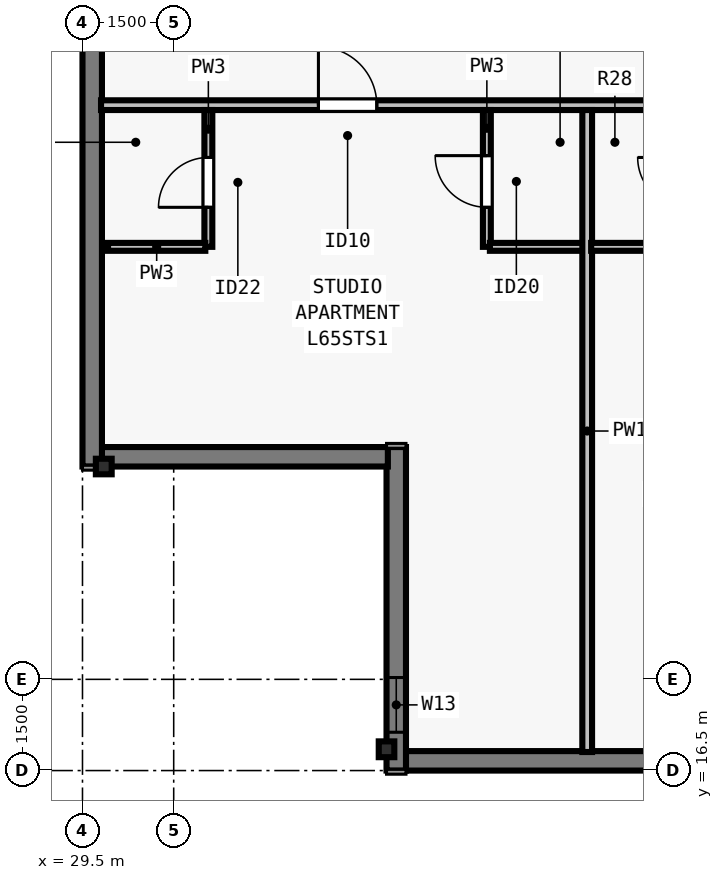
"""IFC4 building model, lengths in metres.
Left out: names, types, materials, properties, quantities, classifications, styles, units other than length and angle.
Written with IfcOpenShell. Run it as: python <this file> out.ifc"""

import sys

from ifc_helpers import new_model, si_unit, direction, frame, frame_2d, origin, origin_2d, place, context, subcontext, project, spatial, rectangle, i_section, extrude, element, fill, save


model = new_model("IFC4")
c1 = context("Model", 3, precision=1e-05, world=origin(), true_north=direction((0.0, 1.0)))
c2 = subcontext(c1, "Body", "Model", "MODEL_VIEW")
j1 = project(units=[si_unit("LENGTHUNIT", "METRE"), si_unit("PLANEANGLEUNIT", "RADIAN")], contexts=[c1])
p1 = place(None, origin())
s1 = spatial("IfcSite", under=j1, at=p1, CompositionType="ELEMENT")
p2 = place(p1, origin())
s2 = spatial("IfcBuilding", under=s1, at=p2, CompositionType="ELEMENT")
p3 = place(p2, frame((0.0, 0.0, 237.5)))
s3 = spatial("IfcBuildingStorey", under=s2, at=p3, CompositionType="ELEMENT", Elevation=237.5)
for number, where, z_axis, x_axis in (
    (1, (34.5, 16.85, 0.0), (0.0, 0.0, 1.0), (1.0, 0.0, 0.0)),
    (2, (29.85, 21.5, 0.0), (0.0, 0.0, 1.0), (0.0, 1.0, 0.0)),
):
    element("IfcColumn", number, at=place(p3, frame(where, z_axis=z_axis, x_axis=x_axis)), inside=s3, PredefinedType="COLUMN", context=c2, shape_type="SweptSolid", body=[
        extrude(i_section(OverallWidth=0.256, OverallDepth=0.26, WebThickness=0.01, FlangeThickness=0.017, FilletRadius=0.013, at=origin_2d()), origin(), (0.0, 0.0, 1.0), 3.5),
    ])
p4 = place(p3, frame((69.5, 16.66, 0.0), z_axis=(0.0, 0.0, 1.0), x_axis=(-1.0, 0.0, 0.0)))
e3 = element("IfcWall", 3, at=p4, inside=s3, PredefinedType="SOLIDWALL", context=c2, shape_type="SweptSolid", body=[
    extrude(rectangle(XDim=34.702, YDim=0.32, at=frame_2d((17.351, 0.0))), origin(), (0.0, 0.0, 1.0), 3.29),
])
p5 = place(p4, frame((4.613, 0.0, 0.8)))
e4 = element("IfcOpeningElement", 4, at=p5, cuts=e3, PredefinedType="OPENING", context=c2, shape_type="SweptSolid", body=[
    extrude(rectangle(XDim=1.85, YDim=1.678, at=frame_2d((0.925, 0.839))), frame((0.0, 0.17, 0.0), z_axis=(0.0, -1.0, 0.0), x_axis=(1.0, 0.0, 0.0)), (0.0, 0.0, 1.0), 0.34),
])
p6 = place(p4, frame((8.138, 0.0, 0.8)))
e5 = element("IfcOpeningElement", 5, at=p6, cuts=e3, PredefinedType="OPENING", context=c2, shape_type="SweptSolid", body=[
    extrude(rectangle(XDim=1.55, YDim=1.678, at=frame_2d((0.775, 0.839))), frame((0.0, 0.17, 0.0), z_axis=(0.0, -1.0, 0.0), x_axis=(1.0, 0.0, 0.0)), (0.0, 0.0, 1.0), 0.34),
])
p7 = place(p4, frame((14.888, 0.0, 0.8)))
e6 = element("IfcOpeningElement", 6, at=p7, cuts=e3, PredefinedType="OPENING", context=c2, shape_type="SweptSolid", body=[
    extrude(rectangle(XDim=1.55, YDim=1.678, at=frame_2d((0.775, 0.839))), frame((0.0, 0.17, 0.0), z_axis=(0.0, -1.0, 0.0), x_axis=(1.0, 0.0, 0.0)), (0.0, 0.0, 1.0), 0.34),
])
p8 = place(p4, frame((18.114, 0.0, 0.8)))
e7 = element("IfcOpeningElement", 7, at=p8, cuts=e3, PredefinedType="OPENING", context=c2, shape_type="SweptSolid", body=[
    extrude(rectangle(XDim=1.85, YDim=1.678, at=frame_2d((0.925, 0.839))), frame((0.0, 0.17, 0.0), z_axis=(0.0, -1.0, 0.0), x_axis=(1.0, 0.0, 0.0)), (0.0, 0.0, 1.0), 0.34),
])
p9 = place(p4, frame((25.714, 0.0, 0.8)))
e8 = element("IfcOpeningElement", 8, at=p9, cuts=e3, PredefinedType="OPENING", context=c2, shape_type="SweptSolid", body=[
    extrude(rectangle(XDim=1.85, YDim=1.678, at=frame_2d((0.925, 0.839))), frame((0.0, 0.17, 0.0), z_axis=(0.0, -1.0, 0.0), x_axis=(1.0, 0.0, 0.0)), (0.0, 0.0, 1.0), 0.34),
])
p10 = place(p4, frame((28.389, 0.0, 0.8)))
e9 = element("IfcOpeningElement", 9, at=p10, cuts=e3, PredefinedType="OPENING", context=c2, shape_type="SweptSolid", body=[
    extrude(rectangle(XDim=1.55, YDim=1.678, at=frame_2d((0.775, 0.839))), frame((0.0, 0.17, 0.0), z_axis=(0.0, -1.0, 0.0), x_axis=(1.0, 0.0, 0.0)), (0.0, 0.0, 1.0), 0.34),
])
p11 = place(p3, frame((34.66, 16.5, 0.0), z_axis=(0.0, 0.0, 1.0), x_axis=(0.0, 1.0, 0.0)))
e10 = element("IfcWall", 10, at=p11, inside=s3, PredefinedType="SOLIDWALL", context=c2, shape_type="SweptSolid", body=[
    extrude(rectangle(XDim=5.32, YDim=0.32, at=frame_2d((2.66, 0.0))), origin(), (0.0, 0.0, 1.0), 3.29),
])
p12 = place(p11, frame((0.63, 0.0, 0.8)))
e11 = element("IfcOpeningElement", 11, at=p12, cuts=e10, PredefinedType="OPENING", context=c2, shape_type="SweptSolid", body=[
    extrude(rectangle(XDim=0.9, YDim=1.678, at=frame_2d((0.45, 0.839))), frame((0.0, 0.17, 0.0), z_axis=(0.0, -1.0, 0.0), x_axis=(1.0, 0.0, 0.0)), (0.0, 0.0, 1.0), 0.34),
])
p13 = place(p3, frame((34.522, 21.66, 0.0), z_axis=(0.0, 0.0, 1.0), x_axis=(-1.0, 0.0, 0.0)))
e12 = element("IfcWall", 12, at=p13, inside=s3, PredefinedType="SOLIDWALL", context=c2, shape_type="SweptSolid", body=[
    extrude(rectangle(XDim=4.724, YDim=0.32, at=frame_2d((2.362, 0.0))), origin(), (0.0, 0.0, 1.0), 3.29),
])
p14 = place(p3, frame((29.66, 21.5, 0.0), z_axis=(0.0, 0.0, 1.0), x_axis=(0.0, 1.0, 0.0)))
e13 = element("IfcWall", 13, at=p14, inside=s3, PredefinedType="SOLIDWALL", context=c2, shape_type="SweptSolid", body=[
    extrude(rectangle(XDim=13.002, YDim=0.32, at=frame_2d((6.501, 0.0))), origin(), (0.0, 0.0, 1.0), 3.29),
])
p15 = place(p14, frame((9.451, 0.0, 0.8)))
e14 = element("IfcOpeningElement", 14, at=p15, cuts=e13, PredefinedType="OPENING", context=c2, shape_type="SweptSolid", body=[
    extrude(rectangle(XDim=1.55, YDim=1.678, at=frame_2d((0.775, 0.839))), frame((0.0, 0.17, 0.0), z_axis=(0.0, -1.0, 0.0), x_axis=(1.0, 0.0, 0.0)), (0.0, 0.0, 1.0), 0.34),
])
p16 = place(p3, frame((29.805, 27.442, 0.0), z_axis=(0.0, 0.0, 1.0), x_axis=(1.0, 0.0, 0.0)))
e15 = element("IfcWall", 15, at=p16, inside=s3, PredefinedType="PARTITIONING", context=c2, shape_type="SweptSolid", body=[
    extrude(rectangle(XDim=44.39, YDim=0.16, at=frame_2d((22.195, 0.0))), origin(), (0.0, 0.0, 1.0), 2.958),
])
p17 = place(p16, frame((3.575, 0.0, 0.0)))
e16 = element("IfcOpeningElement", 16, at=p17, cuts=e15, PredefinedType="OPENING", context=c2, shape_type="SweptSolid", body=[
    extrude(rectangle(XDim=0.96, YDim=2.18, at=frame_2d((0.48, 1.09))), frame((0.0, 0.09, 0.0), z_axis=(0.0, -1.0, 0.0), x_axis=(1.0, 0.0, 0.0)), (0.0, 0.0, 1.0), 0.18),
])
p18 = place(p16, frame((10.755, 0.0, 0.0)))
e17 = element("IfcOpeningElement", 17, at=p18, cuts=e15, PredefinedType="OPENING", context=c2, shape_type="SweptSolid", body=[
    extrude(rectangle(XDim=0.96, YDim=2.18, at=frame_2d((0.48, 1.09))), frame((0.0, 0.09, 0.0), z_axis=(0.0, -1.0, 0.0), x_axis=(1.0, 0.0, 0.0)), (0.0, 0.0, 1.0), 0.18),
])
p19 = place(p16, frame((18.115, 0.0, 0.0)))
e18 = element("IfcOpeningElement", 18, at=p19, cuts=e15, PredefinedType="OPENING", context=c2, shape_type="SweptSolid", body=[
    extrude(rectangle(XDim=0.96, YDim=2.18, at=frame_2d((0.48, 1.09))), frame((0.0, 0.09, 0.0), z_axis=(0.0, -1.0, 0.0), x_axis=(1.0, 0.0, 0.0)), (0.0, 0.0, 1.0), 0.18),
])
p20 = place(p16, frame((25.475, 0.0, 0.0)))
e19 = element("IfcOpeningElement", 19, at=p20, cuts=e15, PredefinedType="OPENING", context=c2, shape_type="SweptSolid", body=[
    extrude(rectangle(XDim=0.96, YDim=2.18, at=frame_2d((0.48, 1.09))), frame((0.0, 0.09, 0.0), z_axis=(0.0, -1.0, 0.0), x_axis=(1.0, 0.0, 0.0)), (0.0, 0.0, 1.0), 0.18),
])
p21 = place(p16, frame((32.835, 0.0, 0.0)))
e20 = element("IfcOpeningElement", 20, at=p21, cuts=e15, PredefinedType="OPENING", context=c2, shape_type="SweptSolid", body=[
    extrude(rectangle(XDim=0.96, YDim=2.18, at=frame_2d((0.48, 1.09))), frame((0.0, 0.09, 0.0), z_axis=(0.0, -1.0, 0.0), x_axis=(1.0, 0.0, 0.0)), (0.0, 0.0, 1.0), 0.18),
])
p22 = place(p16, frame((40.375, 0.0, 0.0)))
e21 = element("IfcOpeningElement", 21, at=p22, cuts=e15, PredefinedType="OPENING", context=c2, shape_type="SweptSolid", body=[
    extrude(rectangle(XDim=0.96, YDim=2.18, at=frame_2d((0.48, 1.09))), frame((0.0, 0.09, 0.0), z_axis=(0.0, -1.0, 0.0), x_axis=(1.0, 0.0, 0.0)), (0.0, 0.0, 1.0), 0.18),
])
p23 = place(p3, frame((31.57, 25.113, 0.0), z_axis=(0.0, 0.0, 1.0), x_axis=(0.0, 1.0, 0.0)))
e22 = element("IfcWall", 22, at=p23, inside=s3, PredefinedType="PLUMBINGWALL", context=c2, shape_type="SweptSolid", body=[
    extrude(rectangle(XDim=2.25, YDim=0.13, at=frame_2d((1.125, 0.0))), origin(), (0.0, 0.0, 1.0), 3.29),
])
p24 = place(p23, frame((0.65, 0.0, 0.0)))
e23 = element("IfcOpeningElement", 23, at=p24, cuts=e22, PredefinedType="OPENING", context=c2, shape_type="SweptSolid", body=[
    extrude(rectangle(XDim=0.82, YDim=2.1, at=frame_2d((0.41, 1.05))), frame((0.0, 0.075, 0.0), z_axis=(0.0, -1.0, 0.0), x_axis=(1.0, 0.0, 0.0)), (0.0, 0.0, 1.0), 0.15),
])
p25 = place(p3, frame((29.92, 25.113, 0.0), z_axis=(0.0, 0.0, 1.0), x_axis=(1.0, 0.0, 0.0)))
e24 = element("IfcWall", 24, at=p25, inside=s3, PredefinedType="PLUMBINGWALL", context=c2, shape_type="SweptSolid", body=[
    extrude(rectangle(XDim=1.6, YDim=0.13, at=frame_2d((0.8, 0.0))), origin(), (0.0, 0.0, 1.0), 3.29),
])
p26 = place(p3, frame((36.15, 25.113, 0.0), z_axis=(0.0, 0.0, 1.0), x_axis=(0.0, 1.0, 0.0)))
e25 = element("IfcWall", 25, at=p26, inside=s3, PredefinedType="PLUMBINGWALL", context=c2, shape_type="SweptSolid", body=[
    extrude(rectangle(XDim=2.25, YDim=0.13, at=frame_2d((1.125, 0.0))), origin(), (0.0, 0.0, 1.0), 3.29),
])
p27 = place(p26, frame((0.65, 0.0, 0.0)))
e26 = element("IfcOpeningElement", 26, at=p27, cuts=e25, PredefinedType="OPENING", context=c2, shape_type="SweptSolid", body=[
    extrude(rectangle(XDim=0.85, YDim=2.1, at=frame_2d((0.425, 1.05))), frame((0.0, 0.075, 0.0), z_axis=(0.0, -1.0, 0.0), x_axis=(1.0, 0.0, 0.0)), (0.0, 0.0, 1.0), 0.15),
])
p28 = place(p3, frame((36.2, 25.113, 0.0), z_axis=(0.0, 0.0, 1.0), x_axis=(1.0, 0.0, 0.0)))
e27 = element("IfcWall", 27, at=p28, inside=s3, PredefinedType="PLUMBINGWALL", context=c2, shape_type="SweptSolid", body=[
    extrude(rectangle(XDim=1.6, YDim=0.13, at=frame_2d((0.8, 0.0))), origin(), (0.0, 0.0, 1.0), 3.29),
])
p29 = place(p3, frame((37.8, 16.805, 0.0), z_axis=(0.0, 0.0, 1.0), x_axis=(0.0, 1.0, 0.0)))
e28 = element("IfcWall", 28, at=p29, inside=s3, PredefinedType="PARTITIONING", context=c2, shape_type="SweptSolid", body=[
    extrude(rectangle(XDim=10.558, YDim=0.16, at=frame_2d((5.279, 0.0))), origin(), (0.0, 0.0, 1.0), 2.573),
])
p30 = place(p3, frame((37.865, 25.113, 0.0), z_axis=(0.0, 0.0, 1.0), x_axis=(1.0, 0.0, 0.0)))
e29 = element("IfcWall", 29, at=p30, inside=s3, PredefinedType="PLUMBINGWALL", context=c2, shape_type="SweptSolid", body=[
    extrude(rectangle(XDim=1.535, YDim=0.13, at=frame_2d((0.768, 0.0))), origin(), (0.0, 0.0, 1.0), 3.29),
])
p31 = place(p12, origin())
e30 = element("IfcWindow", 30, at=p31, inside=s3, PartitioningType="SINGLE_PANEL", PredefinedType="WINDOW", context=c2, shape_type="SweptSolid", body=[
    extrude(rectangle(XDim=0.9, YDim=1.678, at=frame_2d((0.45, 0.839))), frame((0.0, -0.04, 0.0), z_axis=(0.0, -1.0, 0.0), x_axis=(1.0, 0.0, 0.0)), (0.0, 0.0, 1.0), 0.06),
])
fill(e11, e30)
p32 = place(p24, origin())
e31 = element("IfcDoor", 31, at=p32, inside=s3, OperationType="SINGLE_SWING_LEFT", PredefinedType="DOOR", context=c2, shape_type="SweptSolid", body=[
    extrude(rectangle(XDim=0.82, YDim=2.1, at=frame_2d((0.41, 1.05))), frame((0.0, 0.025, 0.0), z_axis=(0.0, -1.0, 0.0), x_axis=(1.0, 0.0, 0.0)), (0.0, 0.0, 1.0), 0.05),
])
fill(e23, e31)
p33 = place(p27, origin())
e32 = element("IfcDoor", 32, at=p33, inside=s3, OperationType="SINGLE_SWING_RIGHT", PredefinedType="DOOR", context=c2, shape_type="SweptSolid", body=[
    extrude(rectangle(XDim=0.85, YDim=2.1, at=frame_2d((0.425, 1.05))), frame((0.0, 0.025, 0.0), z_axis=(0.0, -1.0, 0.0), x_axis=(1.0, 0.0, 0.0)), (0.0, 0.0, 1.0), 0.05),
])
fill(e26, e32)
p34 = place(p17, origin())
e33 = element("IfcDoor", 33, at=p34, inside=s3, OperationType="SINGLE_SWING_LEFT", PredefinedType="DOOR", context=c2, shape_type="SweptSolid", body=[
    extrude(rectangle(XDim=0.96, YDim=2.18, at=frame_2d((0.48, 1.09))), frame((0.0, 0.025, 0.0), z_axis=(0.0, -1.0, 0.0), x_axis=(1.0, 0.0, 0.0)), (0.0, 0.0, 1.0), 0.05),
])
fill(e16, e33)
save(model, sys.argv[1])
